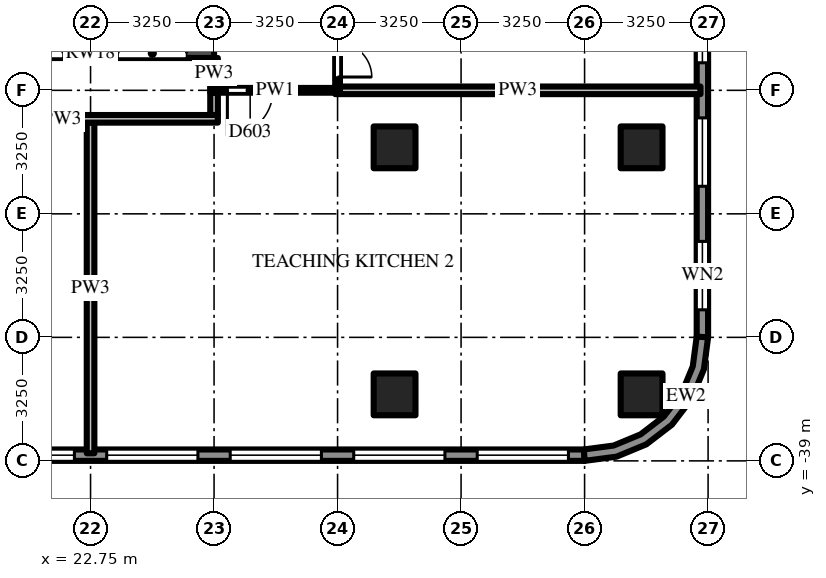
"""IFC4 building model, lengths in metres.
Left out: names, types, materials, properties, quantities, classifications, styles, units other than length and angle.
Written with IfcOpenShell. Run it as: python <this file> out.ifc"""

import sys

from ifc_helpers import new_model, si_unit, direction, frame, frame_2d, origin, origin_2d, place, context, subcontext, project, spatial, polyline, rectangle, outline, extrude, source, transform, mapped, element, fill, save


model = new_model("IFC4")
c1 = context("Model", 3, precision=1e-05, world=origin(), true_north=direction((0.0, 1.0)))
c2 = subcontext(c1, "Body", "Model", "MODEL_VIEW")
j1 = project(units=[si_unit("LENGTHUNIT", "METRE"), si_unit("PLANEANGLEUNIT", "RADIAN")], contexts=[c1])
p1 = place(None, origin())
s1 = spatial("IfcSite", under=j1, at=p1, CompositionType="ELEMENT")
p2 = place(p1, origin())
s2 = spatial("IfcBuilding", under=s1, at=p2, CompositionType="ELEMENT")
p3 = place(p2, frame((0.0, 0.0, 19.0)))
s3 = spatial("IfcBuildingStorey", under=s2, at=p3, CompositionType="ELEMENT", Elevation=19.0)
m1 = source(origin(), c2, "Body", "SweptSolid", [
    extrude(rectangle(XDim=1.1, YDim=1.1, at=origin_2d()), origin(), (0.0, 0.0, 1.0), 5.0),
])
for number, where, z_axis, x_axis in (
    (1, (30.75, -30.75, 0.0), (0.0, 0.0, 1.0), (1.0, 0.0, 0.0)),
    (2, (30.75, -37.25, 0.0), (0.0, 0.0, 1.0), (1.0, 0.0, 0.0)),
    (3, (37.25, -30.75, 0.0), (0.0, 0.0, 1.0), (1.0, 0.0, 0.0)),
    (4, (37.25, -37.25, 0.0), (0.0, 0.0, 1.0), (1.0, 0.0, 0.0)),
):
    element("IfcColumn", number, at=place(p3, frame(where, z_axis=z_axis, x_axis=x_axis)), inside=s3, PredefinedType="COLUMN", context=c2, shape_type="MappedRepresentation", body=[
        mapped(m1, transform((0.0, 0.0, 0.0))),
    ])
m2 = source(origin(), c2, "Body", "SweptSolid", [
    extrude(rectangle(XDim=6.5, YDim=0.25, at=frame_2d((3.25, 0.0))), origin(), (0.0, 0.0, 1.0), 4.7),
])
p4 = place(p3, frame((19.5, -28.275, 0.0), z_axis=(0.0, 0.0, 1.0), x_axis=(1.0, 0.0, 0.0)))
e5 = element("IfcWall", 5, at=p4, inside=s3, PredefinedType="SHEAR", context=c2, shape_type="MappedRepresentation", body=[
    mapped(m2, transform((0.0, 0.0, 0.0))),
])
m3 = source(origin(), c2, "Body", "SweptSolid", [
    extrude(rectangle(XDim=1.8, YDim=2.1, at=frame_2d((0.9, 1.05))), frame((0.0, 0.135, 0.0), z_axis=(0.0, -1.0, 0.0), x_axis=(1.0, 0.0, 0.0)), (0.0, 0.0, 1.0), 0.27),
])
p5 = place(p4, frame((0.725, 0.0, 0.0)))
e6 = element("IfcOpeningElement", 6, at=p5, cuts=e5, PredefinedType="OPENING", context=c2, shape_type="MappedRepresentation", body=[
    mapped(m3, transform((0.0, 0.0, 0.0))),
])
p6 = place(p4, frame((3.975, 0.0, 0.0)))
e7 = element("IfcOpeningElement", 7, at=p6, cuts=e5, PredefinedType="OPENING", context=c2, shape_type="MappedRepresentation", body=[
    mapped(m3, transform((0.0, 0.0, 0.0))),
])
m4 = source(origin(), c2, "Body", "SweptSolid", [
    extrude(rectangle(XDim=71.5, YDim=0.3, at=frame_2d((35.75, 0.0))), origin(), (0.0, 0.0, 1.0), 4.7),
])
p7 = place(p3, frame((38.85, -35.75, 0.0), z_axis=(0.0, 0.0, 1.0), x_axis=(0.0, 1.0, 0.0)))
e8 = element("IfcWall", 8, at=p7, inside=s3, PredefinedType="SOLIDWALL", context=c2, shape_type="MappedRepresentation", body=[
    mapped(m4, transform((0.0, 0.0, 0.0))),
])
m5 = source(origin(), c2, "Body", "SweptSolid", [
    extrude(rectangle(XDim=1.8, YDim=3.0, at=frame_2d((0.9, 1.5))), frame((0.0, 0.16, 0.0), z_axis=(0.0, -1.0, 0.0), x_axis=(1.0, 0.0, 0.0)), (0.0, 0.0, 1.0), 0.32),
])
p8 = place(p7, frame((0.725, 0.0, 0.9)))
e9 = element("IfcOpeningElement", 9, at=p8, cuts=e8, PredefinedType="OPENING", context=c2, shape_type="MappedRepresentation", body=[
    mapped(m5, transform((0.0, 0.0, 0.0))),
])
p9 = place(p7, frame((3.975, 0.0, 0.9)))
e10 = element("IfcOpeningElement", 10, at=p9, cuts=e8, PredefinedType="OPENING", context=c2, shape_type="MappedRepresentation", body=[
    mapped(m5, transform((0.0, 0.0, 0.0))),
])
p10 = place(p7, frame((7.225, 0.0, 0.9)))
e11 = element("IfcOpeningElement", 11, at=p10, cuts=e8, PredefinedType="OPENING", context=c2, shape_type="MappedRepresentation", body=[
    mapped(m5, transform((0.0, 0.0, 0.0))),
])
p11 = place(p7, frame((10.475, 0.0, 0.9)))
e12 = element("IfcOpeningElement", 12, at=p11, cuts=e8, PredefinedType="OPENING", context=c2, shape_type="MappedRepresentation", body=[
    mapped(m5, transform((0.0, 0.0, 0.0))),
])
p12 = place(p7, frame((13.725, 0.0, 0.9)))
e13 = element("IfcOpeningElement", 13, at=p12, cuts=e8, PredefinedType="OPENING", context=c2, shape_type="MappedRepresentation", body=[
    mapped(m5, transform((0.0, 0.0, 0.0))),
])
p13 = place(p7, frame((16.975, 0.0, 0.9)))
e14 = element("IfcOpeningElement", 14, at=p13, cuts=e8, PredefinedType="OPENING", context=c2, shape_type="MappedRepresentation", body=[
    mapped(m5, transform((0.0, 0.0, 0.0))),
])
p14 = place(p7, frame((20.225, 0.0, 0.9)))
e15 = element("IfcOpeningElement", 15, at=p14, cuts=e8, PredefinedType="OPENING", context=c2, shape_type="MappedRepresentation", body=[
    mapped(m5, transform((0.0, 0.0, 0.0))),
])
p15 = place(p7, frame((23.475, 0.0, 0.9)))
e16 = element("IfcOpeningElement", 16, at=p15, cuts=e8, PredefinedType="OPENING", context=c2, shape_type="MappedRepresentation", body=[
    mapped(m5, transform((0.0, 0.0, 0.0))),
])
p16 = place(p7, frame((26.725, 0.0, 0.9)))
e17 = element("IfcOpeningElement", 17, at=p16, cuts=e8, PredefinedType="OPENING", context=c2, shape_type="MappedRepresentation", body=[
    mapped(m5, transform((0.0, 0.0, 0.0))),
])
p17 = place(p7, frame((29.975, 0.0, 0.9)))
e18 = element("IfcOpeningElement", 18, at=p17, cuts=e8, PredefinedType="OPENING", context=c2, shape_type="MappedRepresentation", body=[
    mapped(m5, transform((0.0, 0.0, 0.0))),
])
p18 = place(p7, frame((33.225, 0.0, 0.9)))
e19 = element("IfcOpeningElement", 19, at=p18, cuts=e8, PredefinedType="OPENING", context=c2, shape_type="MappedRepresentation", body=[
    mapped(m5, transform((0.0, 0.0, 0.0))),
])
p19 = place(p7, frame((36.475, 0.0, 0.9)))
e20 = element("IfcOpeningElement", 20, at=p19, cuts=e8, PredefinedType="OPENING", context=c2, shape_type="MappedRepresentation", body=[
    mapped(m5, transform((0.0, 0.0, 0.0))),
])
p20 = place(p7, frame((39.725, 0.0, 0.9)))
e21 = element("IfcOpeningElement", 21, at=p20, cuts=e8, PredefinedType="OPENING", context=c2, shape_type="MappedRepresentation", body=[
    mapped(m5, transform((0.0, 0.0, 0.0))),
])
p21 = place(p7, frame((42.975, 0.0, 0.9)))
e22 = element("IfcOpeningElement", 22, at=p21, cuts=e8, PredefinedType="OPENING", context=c2, shape_type="MappedRepresentation", body=[
    mapped(m5, transform((0.0, 0.0, 0.0))),
])
p22 = place(p7, frame((46.225, 0.0, 0.9)))
e23 = element("IfcOpeningElement", 23, at=p22, cuts=e8, PredefinedType="OPENING", context=c2, shape_type="MappedRepresentation", body=[
    mapped(m5, transform((0.0, 0.0, 0.0))),
])
p23 = place(p7, frame((49.475, 0.0, 0.9)))
e24 = element("IfcOpeningElement", 24, at=p23, cuts=e8, PredefinedType="OPENING", context=c2, shape_type="MappedRepresentation", body=[
    mapped(m5, transform((0.0, 0.0, 0.0))),
])
p24 = place(p7, frame((52.725, 0.0, 0.9)))
e25 = element("IfcOpeningElement", 25, at=p24, cuts=e8, PredefinedType="OPENING", context=c2, shape_type="MappedRepresentation", body=[
    mapped(m5, transform((0.0, 0.0, 0.0))),
])
p25 = place(p7, frame((55.975, 0.0, 0.9)))
e26 = element("IfcOpeningElement", 26, at=p25, cuts=e8, PredefinedType="OPENING", context=c2, shape_type="MappedRepresentation", body=[
    mapped(m5, transform((0.0, 0.0, 0.0))),
])
p26 = place(p7, frame((59.225, 0.0, 0.9)))
e27 = element("IfcOpeningElement", 27, at=p26, cuts=e8, PredefinedType="OPENING", context=c2, shape_type="MappedRepresentation", body=[
    mapped(m5, transform((0.0, 0.0, 0.0))),
])
p27 = place(p7, frame((62.475, 0.0, 0.9)))
e28 = element("IfcOpeningElement", 28, at=p27, cuts=e8, PredefinedType="OPENING", context=c2, shape_type="MappedRepresentation", body=[
    mapped(m5, transform((0.0, 0.0, 0.0))),
])
p28 = place(p7, frame((65.725, 0.0, 0.9)))
e29 = element("IfcOpeningElement", 29, at=p28, cuts=e8, PredefinedType="OPENING", context=c2, shape_type="MappedRepresentation", body=[
    mapped(m5, transform((0.0, 0.0, 0.0))),
])
p29 = place(p7, frame((68.975, 0.0, 0.9)))
e30 = element("IfcOpeningElement", 30, at=p29, cuts=e8, PredefinedType="OPENING", context=c2, shape_type="MappedRepresentation", body=[
    mapped(m5, transform((0.0, 0.0, 0.0))),
])
p30 = place(p3, frame((-35.75, -38.85, 0.0), z_axis=(0.0, 0.0, 1.0), x_axis=(1.0, 0.0, 0.0)))
e31 = element("IfcWall", 31, at=p30, inside=s3, PredefinedType="SOLIDWALL", context=c2, shape_type="MappedRepresentation", body=[
    mapped(m4, transform((0.0, 0.0, 0.0))),
])
m6 = source(origin(), c2, "Body", "SweptSolid", [
    extrude(rectangle(XDim=2.4, YDim=3.0, at=frame_2d((1.2, 1.5))), frame((0.0, 0.16, 0.0), z_axis=(0.0, -1.0, 0.0), x_axis=(1.0, 0.0, 0.0)), (0.0, 0.0, 1.0), 0.32),
])
p31 = place(p30, frame((0.425, 0.0, 0.9)))
e32 = element("IfcOpeningElement", 32, at=p31, cuts=e31, PredefinedType="OPENING", context=c2, shape_type="MappedRepresentation", body=[
    mapped(m6, transform((0.0, 0.0, 0.0))),
])
p32 = place(p30, frame((3.675, 0.0, 0.9)))
e33 = element("IfcOpeningElement", 33, at=p32, cuts=e31, PredefinedType="OPENING", context=c2, shape_type="MappedRepresentation", body=[
    mapped(m6, transform((0.0, 0.0, 0.0))),
])
p33 = place(p30, frame((6.925, 0.0, 0.9)))
e34 = element("IfcOpeningElement", 34, at=p33, cuts=e31, PredefinedType="OPENING", context=c2, shape_type="MappedRepresentation", body=[
    mapped(m6, transform((0.0, 0.0, 0.0))),
])
p34 = place(p30, frame((10.175, 0.0, 0.9)))
e35 = element("IfcOpeningElement", 35, at=p34, cuts=e31, PredefinedType="OPENING", context=c2, shape_type="MappedRepresentation", body=[
    mapped(m6, transform((0.0, 0.0, 0.0))),
])
p35 = place(p30, frame((13.425, 0.0, 0.9)))
e36 = element("IfcOpeningElement", 36, at=p35, cuts=e31, PredefinedType="OPENING", context=c2, shape_type="MappedRepresentation", body=[
    mapped(m6, transform((0.0, 0.0, 0.0))),
])
p36 = place(p30, frame((16.675, 0.0, 0.9)))
e37 = element("IfcOpeningElement", 37, at=p36, cuts=e31, PredefinedType="OPENING", context=c2, shape_type="MappedRepresentation", body=[
    mapped(m6, transform((0.0, 0.0, 0.0))),
])
p37 = place(p30, frame((19.925, 0.0, 0.9)))
e38 = element("IfcOpeningElement", 38, at=p37, cuts=e31, PredefinedType="OPENING", context=c2, shape_type="MappedRepresentation", body=[
    mapped(m6, transform((0.0, 0.0, 0.0))),
])
p38 = place(p30, frame((23.175, 0.0, 0.9)))
e39 = element("IfcOpeningElement", 39, at=p38, cuts=e31, PredefinedType="OPENING", context=c2, shape_type="MappedRepresentation", body=[
    mapped(m6, transform((0.0, 0.0, 0.0))),
])
p39 = place(p30, frame((26.425, 0.0, 0.9)))
e40 = element("IfcOpeningElement", 40, at=p39, cuts=e31, PredefinedType="OPENING", context=c2, shape_type="MappedRepresentation", body=[
    mapped(m6, transform((0.0, 0.0, 0.0))),
])
p40 = place(p30, frame((29.675, 0.0, 0.9)))
e41 = element("IfcOpeningElement", 41, at=p40, cuts=e31, PredefinedType="OPENING", context=c2, shape_type="MappedRepresentation", body=[
    mapped(m6, transform((0.0, 0.0, 0.0))),
])
p41 = place(p30, frame((32.925, 0.0, 0.9)))
e42 = element("IfcOpeningElement", 42, at=p41, cuts=e31, PredefinedType="OPENING", context=c2, shape_type="MappedRepresentation", body=[
    mapped(m6, transform((0.0, 0.0, 0.0))),
])
p42 = place(p30, frame((36.175, 0.0, 0.9)))
e43 = element("IfcOpeningElement", 43, at=p42, cuts=e31, PredefinedType="OPENING", context=c2, shape_type="MappedRepresentation", body=[
    mapped(m6, transform((0.0, 0.0, 0.0))),
])
p43 = place(p30, frame((39.425, 0.0, 0.9)))
e44 = element("IfcOpeningElement", 44, at=p43, cuts=e31, PredefinedType="OPENING", context=c2, shape_type="MappedRepresentation", body=[
    mapped(m6, transform((0.0, 0.0, 0.0))),
])
p44 = place(p30, frame((42.675, 0.0, 0.9)))
e45 = element("IfcOpeningElement", 45, at=p44, cuts=e31, PredefinedType="OPENING", context=c2, shape_type="MappedRepresentation", body=[
    mapped(m6, transform((0.0, 0.0, 0.0))),
])
p45 = place(p30, frame((45.925, 0.0, 0.9)))
e46 = element("IfcOpeningElement", 46, at=p45, cuts=e31, PredefinedType="OPENING", context=c2, shape_type="MappedRepresentation", body=[
    mapped(m6, transform((0.0, 0.0, 0.0))),
])
p46 = place(p30, frame((49.175, 0.0, 0.9)))
e47 = element("IfcOpeningElement", 47, at=p46, cuts=e31, PredefinedType="OPENING", context=c2, shape_type="MappedRepresentation", body=[
    mapped(m6, transform((0.0, 0.0, 0.0))),
])
p47 = place(p30, frame((52.425, 0.0, 0.9)))
e48 = element("IfcOpeningElement", 48, at=p47, cuts=e31, PredefinedType="OPENING", context=c2, shape_type="MappedRepresentation", body=[
    mapped(m6, transform((0.0, 0.0, 0.0))),
])
p48 = place(p30, frame((55.675, 0.0, 0.9)))
e49 = element("IfcOpeningElement", 49, at=p48, cuts=e31, PredefinedType="OPENING", context=c2, shape_type="MappedRepresentation", body=[
    mapped(m6, transform((0.0, 0.0, 0.0))),
])
p49 = place(p30, frame((58.925, 0.0, 0.9)))
e50 = element("IfcOpeningElement", 50, at=p49, cuts=e31, PredefinedType="OPENING", context=c2, shape_type="MappedRepresentation", body=[
    mapped(m6, transform((0.0, 0.0, 0.0))),
])
p50 = place(p30, frame((62.175, 0.0, 0.9)))
e51 = element("IfcOpeningElement", 51, at=p50, cuts=e31, PredefinedType="OPENING", context=c2, shape_type="MappedRepresentation", body=[
    mapped(m6, transform((0.0, 0.0, 0.0))),
])
p51 = place(p30, frame((65.425, 0.0, 0.9)))
e52 = element("IfcOpeningElement", 52, at=p51, cuts=e31, PredefinedType="OPENING", context=c2, shape_type="MappedRepresentation", body=[
    mapped(m6, transform((0.0, 0.0, 0.0))),
])
p52 = place(p30, frame((68.675, 0.0, 0.9)))
e53 = element("IfcOpeningElement", 53, at=p52, cuts=e31, PredefinedType="OPENING", context=c2, shape_type="MappedRepresentation", body=[
    mapped(m6, transform((0.0, 0.0, 0.0))),
])
m7 = source(origin(), c2, "Body", "SweptSolid", [
    extrude(outline(polyline([(35.75, -39.0), (36.591, -38.889), (37.375, -38.565), (38.048, -38.048), (38.565, -37.375), (38.889, -36.591), (39.0, -35.75), (38.7, -35.73), (38.597, -36.513), (38.302, -37.224), (37.834, -37.834), (37.224, -38.302), (36.513, -38.597), (35.73, -38.7), (35.75, -39.0)])), origin(), (0.0, 0.0, 1.0), 4.7),
])
p53 = place(p3, origin())
e54 = element("IfcWall", 54, at=p53, inside=s3, PredefinedType="SOLIDWALL", context=c2, shape_type="MappedRepresentation", body=[
    mapped(m7, transform((0.0, 0.0, 0.0))),
])
m8 = source(origin(), c2, "Body", "SweptSolid", [
    extrude(rectangle(XDim=8.7, YDim=0.2, at=frame_2d((4.35, 0.0))), origin(), (0.0, 0.0, 1.0), 3.762),
])
p54 = place(p3, frame((22.75, -38.8, 0.0), z_axis=(0.0, 0.0, 1.0), x_axis=(0.0, 1.0, 0.0)))
e55 = element("IfcWall", 55, at=p54, inside=s3, PredefinedType="PARTITIONING", context=c2, shape_type="MappedRepresentation", body=[
    mapped(m8, transform((0.0, 0.0, 0.0))),
])
m9 = source(origin(), c2, "Body", "SweptSolid", [
    extrude(rectangle(XDim=0.788, YDim=0.2, at=frame_2d((0.394, 0.0))), origin(), (0.0, 0.0, 1.0), 4.7),
])
p55 = place(p3, frame((26.0, -29.188, 0.0), z_axis=(0.0, 0.0, 1.0), x_axis=(0.0, 1.0, 0.0)))
e56 = element("IfcWall", 56, at=p55, inside=s3, PredefinedType="PARTITIONING", context=c2, shape_type="MappedRepresentation", body=[
    mapped(m9, transform((0.0, 0.0, 0.0))),
])
m10 = source(origin(), c2, "Body", "SweptSolid", [
    extrude(rectangle(XDim=0.587, YDim=0.2, at=frame_2d((0.294, 0.0))), origin(), (0.0, 0.0, 1.0), 4.7),
])
p56 = place(p3, frame((26.0, -29.312, 0.0), z_axis=(0.0, 0.0, 1.0), x_axis=(0.0, -1.0, 0.0)))
e57 = element("IfcWall", 57, at=p56, inside=s3, PredefinedType="PARTITIONING", context=c2, shape_type="MappedRepresentation", body=[
    mapped(m10, transform((0.0, 0.0, 0.0))),
])
p57 = place(p3, frame((29.25, -3.3, 0.0), z_axis=(0.0, 0.0, 1.0), x_axis=(0.0, -1.0, 0.0)))
e58 = element("IfcWall", 58, at=p57, inside=s3, PredefinedType="PARTITIONING", context=c2, shape_type="SweptSolid", body=[
    extrude(rectangle(XDim=25.85, YDim=0.125, at=frame_2d((12.925, 0.0))), origin(), (0.0, 0.0, 1.0), 3.762),
])
m11 = source(origin(), c2, "Body", "SweptSolid", [
    extrude(rectangle(XDim=1.8, YDim=2.1, at=frame_2d((0.9, 1.05))), frame((0.0, 0.073, 0.0), z_axis=(0.0, -1.0, 0.0), x_axis=(1.0, 0.0, 0.0)), (0.0, 0.0, 1.0), 0.145),
])
p58 = place(p57, frame((23.8, 0.0, 0.0)))
e59 = element("IfcOpeningElement", 59, at=p58, cuts=e58, PredefinedType="OPENING", context=c2, shape_type="MappedRepresentation", body=[
    mapped(m11, transform((0.0, 0.0, 0.0))),
])
m12 = source(origin(), c2, "Body", "SweptSolid", [
    extrude(rectangle(XDim=8.2, YDim=0.2, at=frame_2d((4.1, 0.0))), origin(), (0.0, 0.0, 1.0), 3.762),
])
p59 = place(p3, frame((26.1, -30.0, 0.0), z_axis=(0.0, 0.0, 1.0), x_axis=(-1.0, 0.0, 0.0)))
e60 = element("IfcWall", 60, at=p59, inside=s3, PredefinedType="PARTITIONING", context=c2, shape_type="MappedRepresentation", body=[
    mapped(m12, transform((0.0, 0.0, 0.0))),
])
m13 = source(origin(), c2, "Body", "SweptSolid", [
    extrude(rectangle(XDim=9.613, YDim=0.2, at=frame_2d((4.806, 0.0))), origin(), (0.0, 0.0, 1.0), 3.762),
])
p60 = place(p3, frame((29.188, -29.25, 0.0), z_axis=(0.0, 0.0, 1.0), x_axis=(1.0, 0.0, 0.0)))
e61 = element("IfcWall", 61, at=p60, inside=s3, PredefinedType="PARTITIONING", context=c2, shape_type="MappedRepresentation", body=[
    mapped(m13, transform((0.0, 0.0, 0.0))),
])
m14 = source(origin(), c2, "Body", "SweptSolid", [
    extrude(rectangle(XDim=3.413, YDim=0.125, at=frame_2d((1.706, 0.0))), origin(), (0.0, 0.0, 1.0), 4.7),
])
p61 = place(p3, frame((29.312, -29.25, 0.0), z_axis=(0.0, 0.0, 1.0), x_axis=(-1.0, 0.0, 0.0)))
e62 = element("IfcWall", 62, at=p61, inside=s3, PredefinedType="PARTITIONING", context=c2, shape_type="MappedRepresentation", body=[
    mapped(m14, transform((0.0, 0.0, 0.0))),
])
m15 = source(origin(), c2, "Body", "SweptSolid", [
    extrude(rectangle(XDim=1.2, YDim=2.1, at=frame_2d((0.6, 1.05))), frame((0.0, 0.073, 0.0), z_axis=(0.0, -1.0, 0.0), x_axis=(1.0, 0.0, 0.0)), (0.0, 0.0, 1.0), 0.145),
])
p62 = place(p61, frame((1.762, 0.0, 0.0)))
e63 = element("IfcOpeningElement", 63, at=p62, cuts=e62, PredefinedType="OPENING", context=c2, shape_type="MappedRepresentation", body=[
    mapped(m15, transform((0.0, 0.0, 0.0))),
])
m16 = source(origin(), c2, "Body", "SweptSolid", [
    extrude(rectangle(XDim=1.8, YDim=2.1, at=frame_2d((0.9, 1.05))), frame((0.0, 0.025, 0.0), z_axis=(0.0, -1.0, 0.0), x_axis=(1.0, 0.0, 0.0)), (0.0, 0.0, 1.0), 0.05),
])
p63 = place(p5, origin())
e64 = element("IfcDoor", 64, at=p63, inside=s3, OperationType="DOUBLE_DOOR_SINGLE_SWING", PredefinedType="DOOR", context=c2, shape_type="MappedRepresentation", body=[
    mapped(m16, transform((0.0, 0.0, 0.0))),
])
fill(e6, e64)
p64 = place(p6, origin())
e65 = element("IfcDoor", 65, at=p64, inside=s3, OperationType="DOUBLE_DOOR_SINGLE_SWING", PredefinedType="DOOR", context=c2, shape_type="MappedRepresentation", body=[
    mapped(m16, transform((0.0, 0.0, 0.0))),
])
fill(e7, e65)
m17 = source(origin(), c2, "Body", "SweptSolid", [
    extrude(rectangle(XDim=1.8, YDim=3.0, at=frame_2d((0.9, 1.5))), frame((0.0, 0.03, 0.0), z_axis=(0.0, -1.0, 0.0), x_axis=(1.0, 0.0, 0.0)), (0.0, 0.0, 1.0), 0.06),
])
p65 = place(p8, origin())
e66 = element("IfcWindow", 66, at=p65, inside=s3, PartitioningType="SINGLE_PANEL", PredefinedType="WINDOW", context=c2, shape_type="MappedRepresentation", body=[
    mapped(m17, transform((0.0, 0.0, 0.0))),
])
fill(e9, e66)
p66 = place(p9, origin())
e67 = element("IfcWindow", 67, at=p66, inside=s3, PartitioningType="SINGLE_PANEL", PredefinedType="WINDOW", context=c2, shape_type="MappedRepresentation", body=[
    mapped(m17, transform((0.0, 0.0, 0.0))),
])
fill(e10, e67)
p67 = place(p10, origin())
e68 = element("IfcWindow", 68, at=p67, inside=s3, PartitioningType="SINGLE_PANEL", PredefinedType="WINDOW", context=c2, shape_type="MappedRepresentation", body=[
    mapped(m17, transform((0.0, 0.0, 0.0))),
])
fill(e11, e68)
m18 = source(origin(), c2, "Body", "SweptSolid", [
    extrude(rectangle(XDim=2.4, YDim=3.0, at=frame_2d((1.2, 1.5))), frame((0.0, 0.03, 0.0), z_axis=(0.0, -1.0, 0.0), x_axis=(1.0, 0.0, 0.0)), (0.0, 0.0, 1.0), 0.06),
])
p68 = place(p48, origin())
e69 = element("IfcWindow", 69, at=p68, inside=s3, PartitioningType="SINGLE_PANEL", PredefinedType="WINDOW", context=c2, shape_type="MappedRepresentation", body=[
    mapped(m18, transform((0.0, 0.0, 0.0))),
])
fill(e49, e69)
p69 = place(p49, origin())
e70 = element("IfcWindow", 70, at=p69, inside=s3, PartitioningType="SINGLE_PANEL", PredefinedType="WINDOW", context=c2, shape_type="MappedRepresentation", body=[
    mapped(m18, transform((0.0, 0.0, 0.0))),
])
fill(e50, e70)
p70 = place(p50, origin())
e71 = element("IfcWindow", 71, at=p70, inside=s3, PartitioningType="SINGLE_PANEL", PredefinedType="WINDOW", context=c2, shape_type="MappedRepresentation", body=[
    mapped(m18, transform((0.0, 0.0, 0.0))),
])
fill(e51, e71)
p71 = place(p51, origin())
e72 = element("IfcWindow", 72, at=p71, inside=s3, PartitioningType="SINGLE_PANEL", PredefinedType="WINDOW", context=c2, shape_type="MappedRepresentation", body=[
    mapped(m18, transform((0.0, 0.0, 0.0))),
])
fill(e52, e72)
p72 = place(p52, origin())
e73 = element("IfcWindow", 73, at=p72, inside=s3, PartitioningType="SINGLE_PANEL", PredefinedType="WINDOW", context=c2, shape_type="MappedRepresentation", body=[
    mapped(m18, transform((0.0, 0.0, 0.0))),
])
fill(e53, e73)
m19 = source(origin(), c2, "Body", "SweptSolid", [
    extrude(rectangle(XDim=1.2, YDim=2.1, at=frame_2d((0.6, 1.05))), frame((0.0, 0.025, 0.0), z_axis=(0.0, -1.0, 0.0), x_axis=(1.0, 0.0, 0.0)), (0.0, 0.0, 1.0), 0.05),
])
p73 = place(p62, origin())
e74 = element("IfcDoor", 74, at=p73, inside=s3, OperationType="SINGLE_SWING_RIGHT", PredefinedType="DOOR", context=c2, shape_type="MappedRepresentation", body=[
    mapped(m19, transform((0.0, 0.0, 0.0))),
])
fill(e63, e74)
p74 = place(p58, origin())
e75 = element("IfcDoor", 75, at=p74, inside=s3, OperationType="DOUBLE_DOOR_SINGLE_SWING", PredefinedType="DOOR", context=c2, shape_type="MappedRepresentation", body=[
    mapped(m16, transform((0.0, 0.0, 0.0))),
])
fill(e59, e75)
save(model, sys.argv[1])
